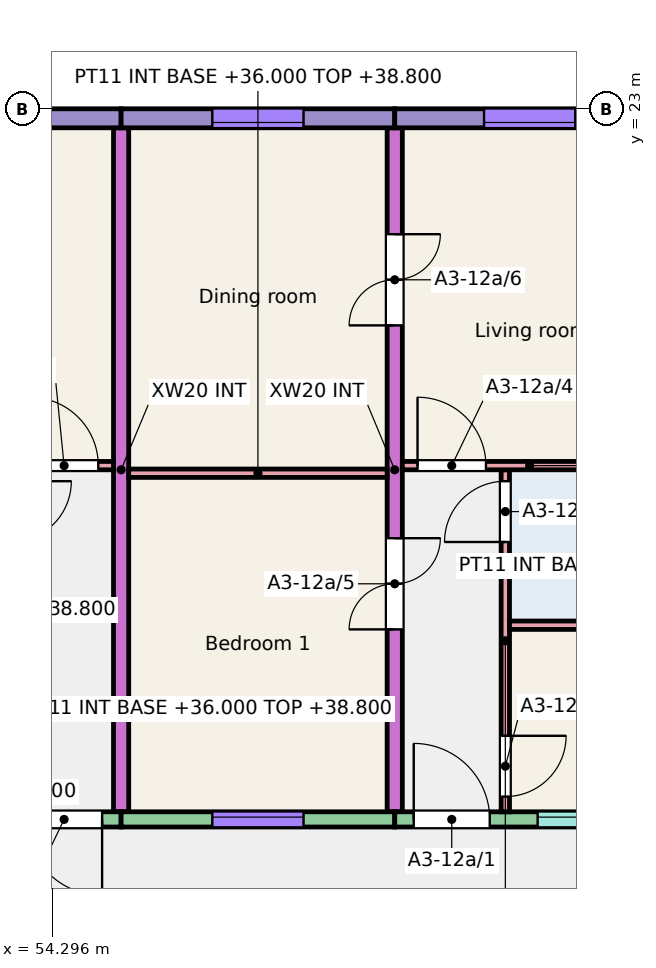
"""IFC4 building model, lengths in metres.
Left out: names, types, materials, properties, quantities, classifications, styles, units other than length and angle.
Written with IfcOpenShell. Run it as: python <this file> out.ifc"""

import sys

from ifc_helpers import new_model, si_unit, direction, frame, frame_2d, origin, place, context, subcontext, project, spatial, rectangle, extrude, element, fill, save


model = new_model("IFC4")
c1 = context("Model", 3, precision=1e-05, world=origin(), true_north=direction((0.0, 1.0)))
c2 = subcontext(c1, "Body", "Model", "MODEL_VIEW")
j1 = project(units=[si_unit("LENGTHUNIT", "METRE"), si_unit("PLANEANGLEUNIT", "RADIAN")], contexts=[c1])
p1 = place(None, origin())
s1 = spatial("IfcSite", under=j1, at=p1, CompositionType="ELEMENT")
p2 = place(p1, origin())
s2 = spatial("IfcBuilding", under=s1, at=p2, CompositionType="ELEMENT")
p3 = place(p2, frame((0.0, 0.0, 36.0)))
s3 = spatial("IfcBuildingStorey", under=s2, at=p3, CompositionType="ELEMENT", Elevation=36.0)
p4 = place(p3, frame((55.2, 13.75, 0.0), z_axis=(0.0, 0.0, 1.0), x_axis=(0.0, 1.0, 0.0)))
e1 = element("IfcWall", 1, at=p4, inside=s3, PredefinedType="SHEAR", context=c2, shape_type="SweptSolid", body=[
    extrude(rectangle(XDim=9.0, YDim=0.2, at=frame_2d((4.5, 0.0))), origin(), (0.0, 0.0, 1.0), 3.0),
])
p5 = place(p3, frame((58.8, 13.75, 0.0), z_axis=(0.0, 0.0, 1.0), x_axis=(0.0, 1.0, 0.0)))
e2 = element("IfcWall", 2, at=p5, inside=s3, PredefinedType="SHEAR", context=c2, shape_type="SweptSolid", body=[
    extrude(rectangle(XDim=9.0, YDim=0.2, at=frame_2d((4.5, 0.0))), origin(), (0.0, 0.0, 1.0), 3.0),
])
p6 = place(p5, frame((2.4, 0.0, 0.0)))
e3 = element("IfcOpeningElement", 3, at=p6, cuts=e2, PredefinedType="OPENING", context=c2, shape_type="SweptSolid", body=[
    extrude(rectangle(XDim=1.2, YDim=2.1, at=frame_2d((0.6, 1.05))), frame((0.0, 0.11, 0.0), z_axis=(0.0, -1.0, 0.0), x_axis=(1.0, 0.0, 0.0)), (0.0, 0.0, 1.0), 0.22),
])
p7 = place(p5, frame((6.4, 0.0, 0.0)))
e4 = element("IfcOpeningElement", 4, at=p7, cuts=e2, PredefinedType="OPENING", context=c2, shape_type="SweptSolid", body=[
    extrude(rectangle(XDim=1.2, YDim=2.1, at=frame_2d((0.6, 1.05))), frame((0.0, 0.11, 0.0), z_axis=(0.0, -1.0, 0.0), x_axis=(1.0, 0.0, 0.0)), (0.0, 0.0, 1.0), 0.22),
])
p8 = place(p3, frame((51.6, 22.875, 0.0), z_axis=(0.0, 0.0, 1.0), x_axis=(1.0, 0.0, 0.0)))
e5 = element("IfcWall", 5, at=p8, inside=s3, PredefinedType="SOLIDWALL", context=c2, shape_type="SweptSolid", body=[
    extrude(rectangle(XDim=3.6, YDim=0.25, at=frame_2d((1.8, 0.0))), origin(), (0.0, 0.0, 1.0), 3.0),
])
p9 = place(p8, frame((1.212, 0.0, 0.8)))
e6 = element("IfcOpeningElement", 6, at=p9, cuts=e5, PredefinedType="OPENING", context=c2, shape_type="SweptSolid", body=[
    extrude(rectangle(XDim=1.2, YDim=1.6, at=frame_2d((0.6, 0.8))), frame((0.0, 0.135, 0.0), z_axis=(0.0, -1.0, 0.0), x_axis=(1.0, 0.0, 0.0)), (0.0, 0.0, 1.0), 0.27),
])
p10 = place(p3, frame((51.6, 13.65, 0.0), z_axis=(0.0, 0.0, 1.0), x_axis=(1.0, 0.0, 0.0)))
e7 = element("IfcWall", 7, at=p10, inside=s3, PredefinedType="SOLIDWALL", context=c2, shape_type="SweptSolid", body=[
    extrude(rectangle(XDim=3.6, YDim=0.2, at=frame_2d((1.8, 0.0))), origin(), (0.0, 0.0, 1.0), 3.0),
])
p11 = place(p10, frame((0.508, 0.0, 1.1)))
e8 = element("IfcOpeningElement", 8, at=p11, cuts=e7, PredefinedType="OPENING", context=c2, shape_type="SweptSolid", body=[
    extrude(rectangle(XDim=1.2, YDim=1.3, at=frame_2d((0.6, 0.65))), frame((0.0, 0.11, 0.0), z_axis=(0.0, -1.0, 0.0), x_axis=(1.0, 0.0, 0.0)), (0.0, 0.0, 1.0), 0.22),
])
p12 = place(p10, frame((2.35, 0.0, 0.0)))
e9 = element("IfcOpeningElement", 9, at=p12, cuts=e7, PredefinedType="OPENING", context=c2, shape_type="SweptSolid", body=[
    extrude(rectangle(XDim=1.0, YDim=2.1, at=frame_2d((0.5, 1.05))), frame((0.0, 0.11, 0.0), z_axis=(0.0, -1.0, 0.0), x_axis=(1.0, 0.0, 0.0)), (0.0, 0.0, 1.0), 0.22),
])
p13 = place(p3, frame((55.2, 22.875, 0.0), z_axis=(0.0, 0.0, 1.0), x_axis=(1.0, 0.0, 0.0)))
e10 = element("IfcWall", 10, at=p13, inside=s3, PredefinedType="SOLIDWALL", context=c2, shape_type="SweptSolid", body=[
    extrude(rectangle(XDim=3.6, YDim=0.25, at=frame_2d((1.8, 0.0))), origin(), (0.0, 0.0, 1.0), 3.0),
])
p14 = place(p13, frame((1.2, 0.0, 0.8)))
e11 = element("IfcOpeningElement", 11, at=p14, cuts=e10, PredefinedType="OPENING", context=c2, shape_type="SweptSolid", body=[
    extrude(rectangle(XDim=1.2, YDim=1.6, at=frame_2d((0.6, 0.8))), frame((0.0, 0.135, 0.0), z_axis=(0.0, -1.0, 0.0), x_axis=(1.0, 0.0, 0.0)), (0.0, 0.0, 1.0), 0.27),
])
p15 = place(p3, frame((55.2, 13.65, 0.0), z_axis=(0.0, 0.0, 1.0), x_axis=(1.0, 0.0, 0.0)))
e12 = element("IfcWall", 12, at=p15, inside=s3, PredefinedType="SOLIDWALL", context=c2, shape_type="SweptSolid", body=[
    extrude(rectangle(XDim=3.6, YDim=0.2, at=frame_2d((1.8, 0.0))), origin(), (0.0, 0.0, 1.0), 3.0),
])
p16 = place(p15, frame((1.2, 0.0, 0.8)))
e13 = element("IfcOpeningElement", 13, at=p16, cuts=e12, PredefinedType="OPENING", context=c2, shape_type="SweptSolid", body=[
    extrude(rectangle(XDim=1.2, YDim=1.6, at=frame_2d((0.6, 0.8))), frame((0.0, 0.11, 0.0), z_axis=(0.0, -1.0, 0.0), x_axis=(1.0, 0.0, 0.0)), (0.0, 0.0, 1.0), 0.22),
])
p17 = place(p3, frame((58.8, 22.875, 0.0), z_axis=(0.0, 0.0, 1.0), x_axis=(1.0, 0.0, 0.0)))
e14 = element("IfcWall", 14, at=p17, inside=s3, PredefinedType="SOLIDWALL", context=c2, shape_type="SweptSolid", body=[
    extrude(rectangle(XDim=3.6, YDim=0.25, at=frame_2d((1.8, 0.0))), origin(), (0.0, 0.0, 1.0), 3.0),
])
p18 = place(p17, frame((1.175, 0.0, 0.8)))
e15 = element("IfcOpeningElement", 15, at=p18, cuts=e14, PredefinedType="OPENING", context=c2, shape_type="SweptSolid", body=[
    extrude(rectangle(XDim=1.2, YDim=1.6, at=frame_2d((0.6, 0.8))), frame((0.0, 0.135, 0.0), z_axis=(0.0, -1.0, 0.0), x_axis=(1.0, 0.0, 0.0)), (0.0, 0.0, 1.0), 0.27),
])
p19 = place(p3, frame((58.8, 13.65, 0.0), z_axis=(0.0, 0.0, 1.0), x_axis=(1.0, 0.0, 0.0)))
e16 = element("IfcWall", 16, at=p19, inside=s3, PredefinedType="SOLIDWALL", context=c2, shape_type="SweptSolid", body=[
    extrude(rectangle(XDim=3.45, YDim=0.2, at=frame_2d((1.725, 0.0))), origin(), (0.0, 0.0, 1.0), 3.0),
])
p20 = place(p19, frame((1.88, 0.0, 1.1)))
e17 = element("IfcOpeningElement", 17, at=p20, cuts=e16, PredefinedType="OPENING", context=c2, shape_type="SweptSolid", body=[
    extrude(rectangle(XDim=1.2, YDim=1.3, at=frame_2d((0.6, 0.65))), frame((0.0, 0.11, 0.0), z_axis=(0.0, -1.0, 0.0), x_axis=(1.0, 0.0, 0.0)), (0.0, 0.0, 1.0), 0.22),
])
p21 = place(p19, frame((0.25, 0.0, 0.0)))
e18 = element("IfcOpeningElement", 18, at=p21, cuts=e16, PredefinedType="OPENING", context=c2, shape_type="SweptSolid", body=[
    extrude(rectangle(XDim=1.0, YDim=2.1, at=frame_2d((0.5, 1.05))), frame((0.0, 0.11, 0.0), z_axis=(0.0, -1.0, 0.0), x_axis=(1.0, 0.0, 0.0)), (0.0, 0.0, 1.0), 0.22),
])
p22 = place(p3, frame((60.255, 13.75, 0.0), z_axis=(0.0, 0.0, 1.0), x_axis=(0.0, 1.0, 0.0)))
e19 = element("IfcWall", 19, at=p22, inside=s3, PredefinedType="PARTITIONING", context=c2, shape_type="SweptSolid", body=[
    extrude(rectangle(XDim=4.5, YDim=0.11, at=frame_2d((2.25, 0.0))), origin(), (0.0, 0.0, 1.0), 2.75),
])
p23 = place(p22, frame((0.2, 0.0, 0.0)))
e20 = element("IfcOpeningElement", 20, at=p23, cuts=e19, PredefinedType="OPENING", context=c2, shape_type="SweptSolid", body=[
    extrude(rectangle(XDim=0.8, YDim=2.1, at=frame_2d((0.4, 1.05))), frame((0.0, 0.065, 0.0), z_axis=(0.0, -1.0, 0.0), x_axis=(1.0, 0.0, 0.0)), (0.0, 0.0, 1.0), 0.13),
])
p24 = place(p22, frame((3.55, 0.0, 0.0)))
e21 = element("IfcOpeningElement", 21, at=p24, cuts=e19, PredefinedType="OPENING", context=c2, shape_type="SweptSolid", body=[
    extrude(rectangle(XDim=0.8, YDim=2.1, at=frame_2d((0.4, 1.05))), frame((0.0, 0.065, 0.0), z_axis=(0.0, -1.0, 0.0), x_axis=(1.0, 0.0, 0.0)), (0.0, 0.0, 1.0), 0.13),
])
p25 = place(p3, frame((60.31, 16.205, 0.0), z_axis=(0.0, 0.0, 1.0), x_axis=(1.0, 0.0, 0.0)))
e22 = element("IfcWall", 22, at=p25, inside=s3, PredefinedType="PARTITIONING", context=c2, shape_type="SweptSolid", body=[
    extrude(rectangle(XDim=1.94, YDim=0.11, at=frame_2d((0.97, 0.0))), origin(), (0.0, 0.0, 1.0), 2.75),
])
p26 = place(p3, frame((58.9, 18.305, 0.0), z_axis=(0.0, 0.0, 1.0), x_axis=(1.0, 0.0, 0.0)))
e23 = element("IfcWall", 23, at=p26, inside=s3, PredefinedType="PARTITIONING", context=c2, shape_type="SweptSolid", body=[
    extrude(rectangle(XDim=3.35, YDim=0.11, at=frame_2d((1.675, 0.0))), origin(), (0.0, 0.0, 1.0), 2.75),
])
p27 = place(p26, frame((0.2, 0.0, 0.0)))
e24 = element("IfcOpeningElement", 24, at=p27, cuts=e23, PredefinedType="OPENING", context=c2, shape_type="SweptSolid", body=[
    extrude(rectangle(XDim=0.9, YDim=2.1, at=frame_2d((0.45, 1.05))), frame((0.0, 0.065, 0.0), z_axis=(0.0, -1.0, 0.0), x_axis=(1.0, 0.0, 0.0)), (0.0, 0.0, 1.0), 0.13),
])
p28 = place(p3, frame((55.3, 18.205, 0.0), z_axis=(0.0, 0.0, 1.0), x_axis=(1.0, 0.0, 0.0)))
e25 = element("IfcWall", 25, at=p28, inside=s3, PredefinedType="PARTITIONING", context=c2, shape_type="SweptSolid", body=[
    extrude(rectangle(XDim=3.4, YDim=0.11, at=frame_2d((1.7, 0.0))), origin(), (0.0, 0.0, 1.0), 2.8),
])
p29 = place(p3, frame((51.725, 18.305, 0.0), z_axis=(0.0, 0.0, 1.0), x_axis=(1.0, 0.0, 0.0)))
e26 = element("IfcWall", 26, at=p29, inside=s3, PredefinedType="PARTITIONING", context=c2, shape_type="SweptSolid", body=[
    extrude(rectangle(XDim=3.375, YDim=0.11, at=frame_2d((1.688, 0.0))), origin(), (0.0, 0.0, 1.0), 2.8),
])
p30 = place(p29, frame((2.275, 0.0, 0.0)))
e27 = element("IfcOpeningElement", 27, at=p30, cuts=e26, PredefinedType="OPENING", context=c2, shape_type="SweptSolid", body=[
    extrude(rectangle(XDim=0.9, YDim=2.1, at=frame_2d((0.45, 1.05))), frame((0.0, 0.065, 0.0), z_axis=(0.0, -1.0, 0.0), x_axis=(1.0, 0.0, 0.0)), (0.0, 0.0, 1.0), 0.13),
])
p31 = place(p16, origin())
e28 = element("IfcWindow", 28, at=p31, inside=s3, PartitioningType="SINGLE_PANEL", PredefinedType="WINDOW", context=c2, shape_type="SweptSolid", body=[
    extrude(rectangle(XDim=1.2, YDim=1.6, at=frame_2d((0.6, 0.8))), frame((0.0, 0.06, 0.0), z_axis=(0.0, -1.0, 0.0), x_axis=(1.0, 0.0, 0.0)), (0.0, 0.0, 1.0), 0.06),
])
fill(e13, e28)
p32 = place(p14, origin())
e29 = element("IfcWindow", 29, at=p32, inside=s3, PartitioningType="SINGLE_PANEL", PredefinedType="WINDOW", context=c2, shape_type="SweptSolid", body=[
    extrude(rectangle(XDim=1.2, YDim=1.6, at=frame_2d((0.6, 0.8))), frame((0.0, -0.025, 0.0), z_axis=(0.0, -1.0, 0.0), x_axis=(1.0, 0.0, 0.0)), (0.0, 0.0, 1.0), 0.06),
])
fill(e11, e29)
p33 = place(p20, origin())
e30 = element("IfcWindow", 30, at=p33, inside=s3, PartitioningType="SINGLE_PANEL", PredefinedType="WINDOW", context=c2, shape_type="SweptSolid", body=[
    extrude(rectangle(XDim=1.2, YDim=1.3, at=frame_2d((0.6, 0.65))), frame((0.0, 0.06, 0.0), z_axis=(0.0, -1.0, 0.0), x_axis=(1.0, 0.0, 0.0)), (0.0, 0.0, 1.0), 0.06),
])
fill(e17, e30)
p34 = place(p18, origin())
e31 = element("IfcWindow", 31, at=p34, inside=s3, PartitioningType="SINGLE_PANEL", PredefinedType="WINDOW", context=c2, shape_type="SweptSolid", body=[
    extrude(rectangle(XDim=1.2, YDim=1.6, at=frame_2d((0.6, 0.8))), frame((0.0, -0.025, 0.0), z_axis=(0.0, -1.0, 0.0), x_axis=(1.0, 0.0, 0.0)), (0.0, 0.0, 1.0), 0.06),
])
fill(e15, e31)
p35 = place(p21, origin())
e32 = element("IfcDoor", 32, at=p35, inside=s3, OperationType="SINGLE_SWING_LEFT", PredefinedType="DOOR", context=c2, shape_type="SweptSolid", body=[
    extrude(rectangle(XDim=1.0, YDim=2.1, at=frame_2d((0.5, 1.05))), frame((0.0, 0.025, 0.0), z_axis=(0.0, -1.0, 0.0), x_axis=(1.0, 0.0, 0.0)), (0.0, 0.0, 1.0), 0.05),
])
fill(e18, e32)
p36 = place(p23, origin())
e33 = element("IfcDoor", 33, at=p36, inside=s3, OperationType="SINGLE_SWING_RIGHT", PredefinedType="DOOR", context=c2, shape_type="SweptSolid", body=[
    extrude(rectangle(XDim=0.8, YDim=2.1, at=frame_2d((0.4, 1.05))), frame((0.0, 0.025, 0.0), z_axis=(0.0, -1.0, 0.0), x_axis=(1.0, 0.0, 0.0)), (0.0, 0.0, 1.0), 0.05),
])
fill(e20, e33)
p37 = place(p24, origin())
e34 = element("IfcDoor", 34, at=p37, inside=s3, OperationType="SINGLE_SWING_LEFT", PredefinedType="DOOR", context=c2, shape_type="SweptSolid", body=[
    extrude(rectangle(XDim=0.8, YDim=2.1, at=frame_2d((0.4, 1.05))), frame((0.0, 0.025, 0.0), z_axis=(0.0, -1.0, 0.0), x_axis=(1.0, 0.0, 0.0)), (0.0, 0.0, 1.0), 0.05),
])
fill(e21, e34)
p38 = place(p27, origin())
e35 = element("IfcDoor", 35, at=p38, inside=s3, OperationType="SINGLE_SWING_LEFT", PredefinedType="DOOR", context=c2, shape_type="SweptSolid", body=[
    extrude(rectangle(XDim=0.9, YDim=2.1, at=frame_2d((0.45, 1.05))), frame((0.0, 0.025, 0.0), z_axis=(0.0, -1.0, 0.0), x_axis=(1.0, 0.0, 0.0)), (0.0, 0.0, 1.0), 0.05),
])
fill(e24, e35)
p39 = place(p6, origin())
e36 = element("IfcDoor", 36, at=p39, inside=s3, OperationType="DOUBLE_DOOR_SINGLE_SWING", PredefinedType="DOOR", context=c2, shape_type="SweptSolid", body=[
    extrude(rectangle(XDim=1.2, YDim=2.1, at=frame_2d((0.6, 1.05))), frame((0.0, 0.025, 0.0), z_axis=(0.0, -1.0, 0.0), x_axis=(1.0, 0.0, 0.0)), (0.0, 0.0, 1.0), 0.05),
])
fill(e3, e36)
p40 = place(p7, origin())
e37 = element("IfcDoor", 37, at=p40, inside=s3, OperationType="DOUBLE_DOOR_SINGLE_SWING", PredefinedType="DOOR", context=c2, shape_type="SweptSolid", body=[
    extrude(rectangle(XDim=1.2, YDim=2.1, at=frame_2d((0.6, 1.05))), frame((0.0, 0.025, 0.0), z_axis=(0.0, -1.0, 0.0), x_axis=(1.0, 0.0, 0.0)), (0.0, 0.0, 1.0), 0.05),
])
fill(e4, e37)
p41 = place(p12, origin())
e38 = element("IfcDoor", 38, at=p41, inside=s3, OperationType="SINGLE_SWING_RIGHT", PredefinedType="DOOR", context=c2, shape_type="SweptSolid", body=[
    extrude(rectangle(XDim=1.0, YDim=2.1, at=frame_2d((0.5, 1.05))), frame((0.0, 0.025, 0.0), z_axis=(0.0, -1.0, 0.0), x_axis=(1.0, 0.0, 0.0)), (0.0, 0.0, 1.0), 0.05),
])
fill(e9, e38)
p42 = place(p30, origin())
e39 = element("IfcDoor", 39, at=p42, inside=s3, OperationType="SINGLE_SWING_LEFT", PredefinedType="DOOR", context=c2, shape_type="SweptSolid", body=[
    extrude(rectangle(XDim=0.9, YDim=2.1, at=frame_2d((0.45, 1.05))), frame((0.0, 0.025, 0.0), z_axis=(0.0, -1.0, 0.0), x_axis=(1.0, 0.0, 0.0)), (0.0, 0.0, 1.0), 0.05),
])
fill(e27, e39)
save(model, sys.argv[1])
